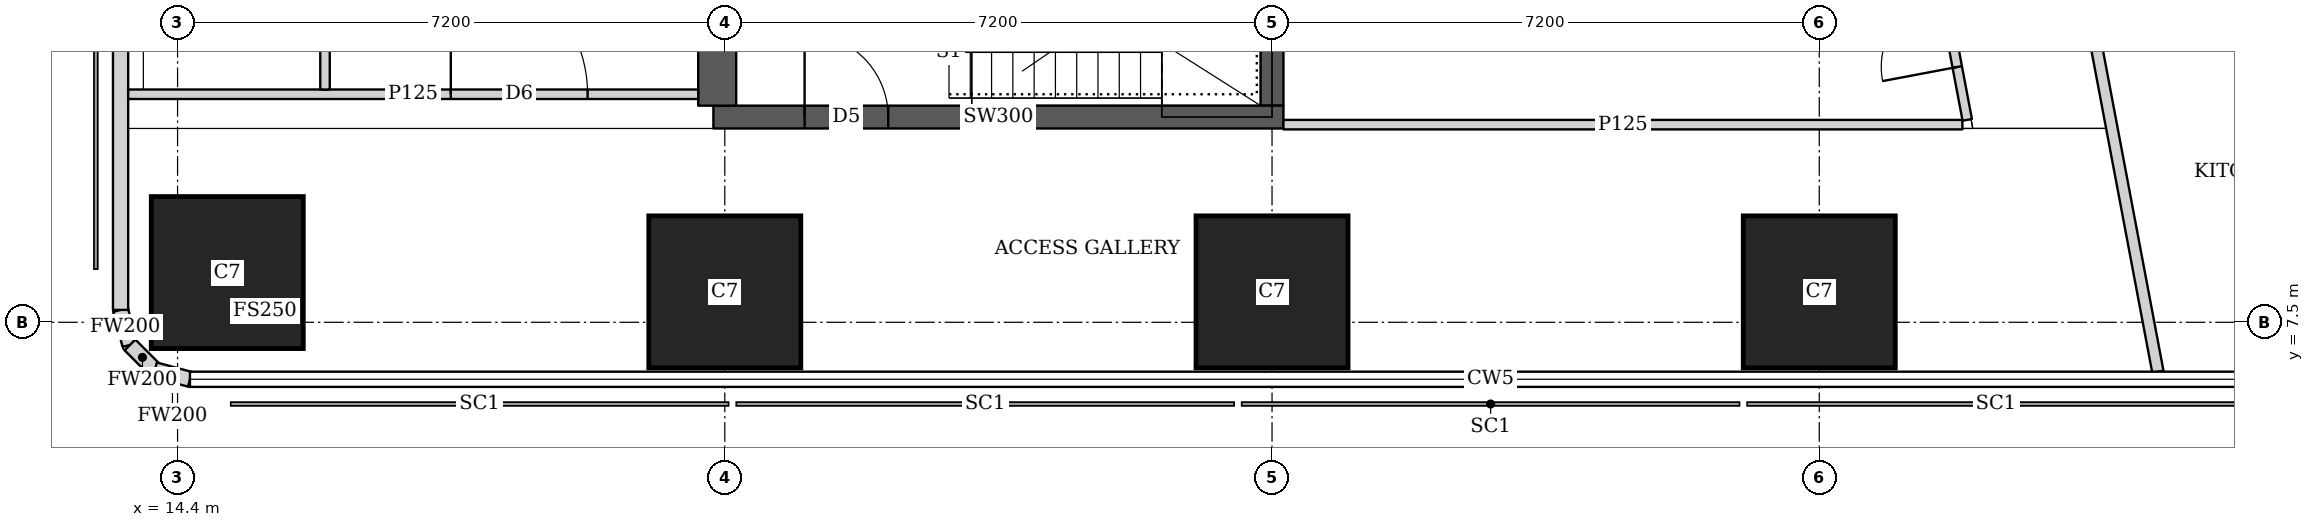
"""IFC4 building model, lengths in metres.
Left out: names, types, materials, properties, quantities, classifications, styles, units other than length and angle.
Written with IfcOpenShell. Run it as: python <this file> out.ifc"""

import sys

from ifc_helpers import new_model, si_unit, direction, frame, frame_2d, origin, origin_2d, place, context, subcontext, project, spatial, rectangle, extrude, element, fill, save


model = new_model("IFC4")
c1 = context("Model", 3, precision=1e-05, world=origin(), true_north=direction((0.0, 1.0)))
c2 = subcontext(c1, "Body", "Model", "MODEL_VIEW")
j1 = project(units=[si_unit("LENGTHUNIT", "METRE"), si_unit("PLANEANGLEUNIT", "RADIAN")], contexts=[c1])
p1 = place(None, origin())
s1 = spatial("IfcSite", under=j1, at=p1, CompositionType="ELEMENT")
p2 = place(p1, origin())
s2 = spatial("IfcBuilding", under=s1, at=p2, CompositionType="ELEMENT")
p3 = place(p2, frame((0.0, 0.0, 281.6)))
s3 = spatial("IfcBuildingStorey", under=s2, at=p3, CompositionType="ELEMENT", Elevation=281.6)
for number, where, z_axis, x_axis in (
    (1, (15.054, 8.154, 0.0), (0.0, 0.0, 1.0), (1.0, 0.0, 0.0)),
    (2, (21.6, 7.9, 0.0), (0.0, 0.0, 1.0), (1.0, 0.0, 0.0)),
    (3, (28.8, 7.9, 0.0), (0.0, 0.0, 1.0), (1.0, 0.0, 0.0)),
    (4, (36.0, 7.9, 0.0), (0.0, 0.0, 1.0), (1.0, 0.0, 0.0)),
):
    element("IfcColumn", number, at=place(p3, frame(where, z_axis=z_axis, x_axis=x_axis)), inside=s3, PredefinedType="COLUMN", context=c2, shape_type="SweptSolid", body=[
        extrude(rectangle(XDim=2.0, YDim=2.0, at=origin_2d()), origin(), (0.0, 0.0, 1.0), 3.75),
    ])
p4 = place(p3, frame((21.45, 10.2, 0.0), z_axis=(0.0, 0.0, 1.0), x_axis=(1.0, 0.0, 0.0)))
e5 = element("IfcWall", 5, at=p4, inside=s3, PredefinedType="SHEAR", context=c2, shape_type="SweptSolid", body=[
    extrude(rectangle(XDim=7.5, YDim=0.3, at=frame_2d((3.75, 0.0))), origin(), (0.0, 0.0, 1.0), 3.75),
])
p5 = place(p4, frame((1.2, 0.0, 0.0)))
e6 = element("IfcOpeningElement", 6, at=p5, cuts=e5, PredefinedType="OPENING", context=c2, shape_type="SweptSolid", body=[
    extrude(rectangle(XDim=1.1, YDim=2.1, at=frame_2d((0.55, 1.05))), frame((0.0, 0.16, 0.0), z_axis=(0.0, -1.0, 0.0), x_axis=(1.0, 0.0, 0.0)), (0.0, 0.0, 1.0), 0.32),
])
p6 = place(p3, frame((21.5, 10.35, 0.0), z_axis=(0.0, 0.0, 1.0), x_axis=(0.0, 1.0, 0.0)))
e7 = element("IfcWall", 7, at=p6, inside=s3, PredefinedType="SHEAR", context=c2, shape_type="SweptSolid", body=[
    extrude(rectangle(XDim=4.2, YDim=0.5, at=frame_2d((2.1, 0.0))), origin(), (0.0, 0.0, 1.0), 3.75),
])
p7 = place(p3, frame((28.8, 10.35, 0.0), z_axis=(0.0, 0.0, 1.0), x_axis=(0.0, 1.0, 0.0)))
e8 = element("IfcWall", 8, at=p7, inside=s3, PredefinedType="SHEAR", context=c2, shape_type="SweptSolid", body=[
    extrude(rectangle(XDim=4.2, YDim=0.3, at=frame_2d((2.1, 0.0))), origin(), (0.0, 0.0, 1.0), 3.75),
])
p8 = place(p3, frame((13.65, 43.037, 0.0), z_axis=(0.0, 0.0, 1.0), x_axis=(0.0, -1.0, 0.0)))
e9 = element("IfcWall", 9, at=p8, inside=s3, PredefinedType="SOLIDWALL", context=c2, shape_type="SweptSolid", body=[
    extrude(rectangle(XDim=35.374, YDim=0.2, at=frame_2d((17.687, 0.0))), origin(), (0.0, 0.0, 1.0), 3.5),
])
p9 = place(p8, frame((1.959, 0.0, 0.9)))
e10 = element("IfcOpeningElement", 10, at=p9, cuts=e9, PredefinedType="OPENING", context=c2, shape_type="SweptSolid", body=[
    extrude(rectangle(XDim=1.8, YDim=1.5, at=frame_2d((0.9, 0.75))), frame((0.0, 0.11, 0.0), z_axis=(0.0, -1.0, 0.0), x_axis=(1.0, 0.0, 0.0)), (0.0, 0.0, 1.0), 0.22),
])
p10 = place(p3, frame((13.65, 7.663, 0.0), z_axis=(0.0, 0.0, 1.0), x_axis=(0.259698463175, -0.965689757751, 0.0)))
e11 = element("IfcWall", 11, at=p10, inside=s3, PredefinedType="SOLIDWALL", context=c2, shape_type="SweptSolid", body=[
    extrude(rectangle(XDim=0.478, YDim=0.2, at=frame_2d((0.239, 0.0))), origin(), (0.0, 0.0, 1.0), 3.5),
])
p11 = place(p3, frame((13.774, 7.202, 0.0), z_axis=(0.0, 0.0, 1.0), x_axis=(0.707369890659, -0.706843573776, 0.0)))
e12 = element("IfcWall", 12, at=p11, inside=s3, PredefinedType="SOLIDWALL", context=c2, shape_type="SweptSolid", body=[
    extrude(rectangle(XDim=0.464, YDim=0.2, at=frame_2d((0.232, 0.0))), origin(), (0.0, 0.0, 1.0), 3.5),
])
p12 = place(p3, frame((14.102, 6.874, 0.0), z_axis=(0.0, 0.0, 1.0), x_axis=(0.965655254015, -0.259826731483, 0.0)))
e13 = element("IfcWall", 13, at=p12, inside=s3, PredefinedType="SOLIDWALL", context=c2, shape_type="SweptSolid", body=[
    extrude(rectangle(XDim=0.477, YDim=0.2, at=frame_2d((0.239, 0.0))), origin(), (0.0, 0.0, 1.0), 3.5),
])
p13 = place(p3, frame((33.781, 42.186, 0.0), z_axis=(0.0, 0.0, 1.0), x_axis=(0.185593518645, -0.9826266055, 0.0)))
e14 = element("IfcWall", 14, at=p13, inside=s3, PredefinedType="SOLIDWALL", context=c2, shape_type="SweptSolid", body=[
    extrude(rectangle(XDim=35.961, YDim=0.15, at=frame_2d((17.98, 0.0))), origin(), (0.0, 0.0, 1.0), 2.5),
])
p14 = place(p13, frame((11.76, 0.0, 0.0)))
e15 = element("IfcOpeningElement", 15, at=p14, cuts=e14, PredefinedType="OPENING", context=c2, shape_type="SweptSolid", body=[
    extrude(rectangle(XDim=1.0, YDim=2.1, at=frame_2d((0.5, 1.05))), frame((0.0, 0.085, 0.0), z_axis=(0.0, -1.0, 0.0), x_axis=(1.0, 0.0, 0.0)), (0.0, 0.0, 1.0), 0.17),
])
p15 = place(p13, frame((15.576, 0.0, 0.0)))
e16 = element("IfcOpeningElement", 16, at=p15, cuts=e14, PredefinedType="OPENING", context=c2, shape_type="SweptSolid", body=[
    extrude(rectangle(XDim=1.0, YDim=2.1, at=frame_2d((0.5, 1.05))), frame((0.0, 0.085, 0.0), z_axis=(0.0, -1.0, 0.0), x_axis=(1.0, 0.0, 0.0)), (0.0, 0.0, 1.0), 0.17),
])
p16 = place(p13, frame((30.502, 0.0, 0.0)))
e17 = element("IfcOpeningElement", 17, at=p16, cuts=e14, PredefinedType="OPENING", context=c2, shape_type="SweptSolid", body=[
    extrude(rectangle(XDim=1.0, YDim=2.1, at=frame_2d((0.5, 1.05))), frame((0.0, 0.085, 0.0), z_axis=(0.0, -1.0, 0.0), x_axis=(1.0, 0.0, 0.0)), (0.0, 0.0, 1.0), 0.17),
])
p17 = place(p3, frame((13.75, 10.5, 0.0), z_axis=(0.0, 0.0, 1.0), x_axis=(1.0, 0.0, 0.0)))
e18 = element("IfcWall", 18, at=p17, inside=s3, PredefinedType="PARTITIONING", context=c2, shape_type="SweptSolid", body=[
    extrude(rectangle(XDim=7.5, YDim=0.125, at=frame_2d((3.75, 0.0))), origin(), (0.0, 0.0, 1.0), 3.5),
])
p18 = place(p17, frame((4.245, 0.0, 0.0)))
e19 = element("IfcOpeningElement", 19, at=p18, cuts=e18, PredefinedType="OPENING", context=c2, shape_type="SweptSolid", body=[
    extrude(rectangle(XDim=1.8, YDim=2.1, at=frame_2d((0.9, 1.05))), frame((0.0, 0.073, 0.0), z_axis=(0.0, -1.0, 0.0), x_axis=(1.0, 0.0, 0.0)), (0.0, 0.0, 1.0), 0.145),
])
p19 = place(p3, frame((16.34, 10.562, 0.0), z_axis=(0.0, 0.0, 1.0), x_axis=(0.0, 1.0, 0.0)))
e20 = element("IfcWall", 20, at=p19, inside=s3, PredefinedType="PARTITIONING", context=c2, shape_type="SweptSolid", body=[
    extrude(rectangle(XDim=3.988, YDim=0.125, at=frame_2d((1.994, 0.0))), origin(), (0.0, 0.0, 1.0), 3.5),
])
p20 = place(p19, frame((1.438, 0.0, 0.0)))
e21 = element("IfcOpeningElement", 21, at=p20, cuts=e20, PredefinedType="OPENING", context=c2, shape_type="SweptSolid", body=[
    extrude(rectangle(XDim=1.0, YDim=2.1, at=frame_2d((0.5, 1.05))), frame((0.0, 0.073, 0.0), z_axis=(0.0, -1.0, 0.0), x_axis=(1.0, 0.0, 0.0)), (0.0, 0.0, 1.0), 0.145),
])
p21 = place(p3, frame((28.95, 10.1, 0.0), z_axis=(0.0, 0.0, 1.0), x_axis=(1.0, 0.0, 0.0)))
e22 = element("IfcWall", 22, at=p21, inside=s3, PredefinedType="PARTITIONING", context=c2, shape_type="SweptSolid", body=[
    extrude(rectangle(XDim=8.933, YDim=0.125, at=frame_2d((4.467, 0.0))), origin(), (0.0, 0.0, 1.0), 3.5),
])
p22 = place(p3, frame((37.947, 10.163, 0.0), z_axis=(0.0, 0.0, 1.0), x_axis=(-0.185572770922, 0.982630523998, 0.0)))
e23 = element("IfcWall", 23, at=p22, inside=s3, PredefinedType="PARTITIONING", context=c2, shape_type="SweptSolid", body=[
    extrude(rectangle(XDim=25.111, YDim=0.125, at=frame_2d((12.556, 0.0))), origin(), (0.0, 0.0, 1.0), 2.5),
])
p23 = place(p22, frame((0.708, 0.0, 0.0)))
e24 = element("IfcOpeningElement", 24, at=p23, cuts=e23, PredefinedType="OPENING", context=c2, shape_type="SweptSolid", body=[
    extrude(rectangle(XDim=1.0, YDim=2.1, at=frame_2d((0.5, 1.05))), frame((0.0, 0.073, 0.0), z_axis=(0.0, -1.0, 0.0), x_axis=(1.0, 0.0, 0.0)), (0.0, 0.0, 1.0), 0.145),
])
p24 = place(p22, frame((5.9, 0.0, 0.0)))
e25 = element("IfcOpeningElement", 25, at=p24, cuts=e23, PredefinedType="OPENING", context=c2, shape_type="SweptSolid", body=[
    extrude(rectangle(XDim=1.0, YDim=2.1, at=frame_2d((0.5, 1.05))), frame((0.0, 0.073, 0.0), z_axis=(0.0, -1.0, 0.0), x_axis=(1.0, 0.0, 0.0)), (0.0, 0.0, 1.0), 0.145),
])
p25 = place(p22, frame((13.378, 0.0, 0.0)))
e26 = element("IfcOpeningElement", 26, at=p25, cuts=e23, PredefinedType="OPENING", context=c2, shape_type="SweptSolid", body=[
    extrude(rectangle(XDim=1.0, YDim=2.1, at=frame_2d((0.5, 1.05))), frame((0.0, 0.073, 0.0), z_axis=(0.0, -1.0, 0.0), x_axis=(1.0, 0.0, 0.0)), (0.0, 0.0, 1.0), 0.145),
])
p26 = place(p22, frame((21.15, 0.0, 0.0)))
e27 = element("IfcOpeningElement", 27, at=p26, cuts=e23, PredefinedType="OPENING", context=c2, shape_type="SweptSolid", body=[
    extrude(rectangle(XDim=1.0, YDim=2.1, at=frame_2d((0.5, 1.05))), frame((0.0, 0.073, 0.0), z_axis=(0.0, -1.0, 0.0), x_axis=(1.0, 0.0, 0.0)), (0.0, 0.0, 1.0), 0.145),
])
p27 = place(p18, origin())
e28 = element("IfcDoor", 28, at=p27, inside=s3, OperationType="DOUBLE_DOOR_SINGLE_SWING", PredefinedType="DOOR", context=c2, shape_type="SweptSolid", body=[
    extrude(rectangle(XDim=1.8, YDim=2.1, at=frame_2d((0.9, 1.05))), frame((0.0, 0.025, 0.0), z_axis=(0.0, -1.0, 0.0), x_axis=(1.0, 0.0, 0.0)), (0.0, 0.0, 1.0), 0.05),
])
fill(e19, e28)
p28 = place(p23, origin())
e29 = element("IfcDoor", 29, at=p28, inside=s3, OperationType="SINGLE_SWING_LEFT", PredefinedType="DOOR", context=c2, shape_type="SweptSolid", body=[
    extrude(rectangle(XDim=1.0, YDim=2.1, at=frame_2d((0.5, 1.05))), frame((0.0, 0.025, 0.0), z_axis=(0.0, -1.0, 0.0), x_axis=(1.0, 0.0, 0.0)), (0.0, 0.0, 1.0), 0.05),
])
fill(e24, e29)
p29 = place(p5, origin())
e30 = element("IfcDoor", 30, at=p29, inside=s3, OperationType="SINGLE_SWING_LEFT", PredefinedType="DOOR", context=c2, shape_type="SweptSolid", body=[
    extrude(rectangle(XDim=1.1, YDim=2.1, at=frame_2d((0.55, 1.05))), frame((0.0, 0.025, 0.0), z_axis=(0.0, -1.0, 0.0), x_axis=(1.0, 0.0, 0.0)), (0.0, 0.0, 1.0), 0.05),
])
fill(e6, e30)
save(model, sys.argv[1])
